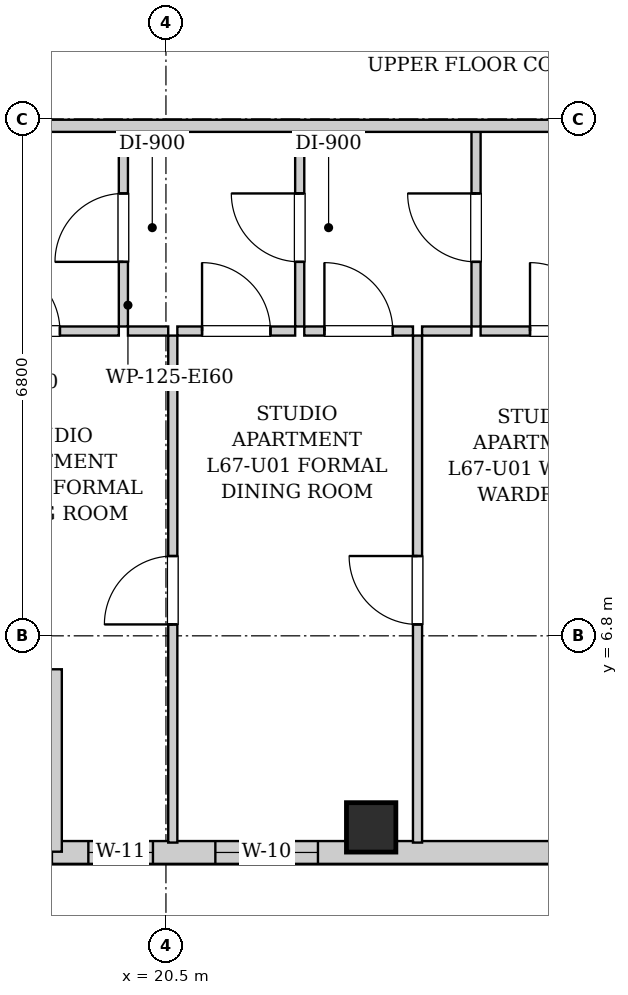
"""IFC4 building model, lengths in metres.
Left out: names, types, materials, properties, quantities, classifications, styles, units other than length and angle.
Written with IfcOpenShell. Run it as: python <this file> out.ifc"""

import sys

from ifc_helpers import new_model, si_unit, direction, frame, frame_2d, origin, origin_2d, place, context, subcontext, project, spatial, rectangle, extrude, element, fill, save


model = new_model("IFC4")
c1 = context("Model", 3, precision=1e-05, world=origin(), true_north=direction((0.0, 1.0)))
c2 = subcontext(c1, "Body", "Model", "MODEL_VIEW")
j1 = project(units=[si_unit("LENGTHUNIT", "METRE"), si_unit("PLANEANGLEUNIT", "RADIAN")], contexts=[c1])
p1 = place(None, origin())
s1 = spatial("IfcSite", under=j1, at=p1, CompositionType="ELEMENT")
p2 = place(p1, origin())
s2 = spatial("IfcBuilding", under=s1, at=p2, CompositionType="ELEMENT")
p3 = place(p2, frame((0.0, 0.0, 230.9)))
s3 = spatial("IfcBuildingStorey", under=s2, at=p3, CompositionType="ELEMENT", Elevation=230.9)
p4 = place(p3, frame((23.2, 4.28, 0.0), z_axis=(0.0, 0.0, 1.0), x_axis=(1.0, 0.0, 0.0)))
e1 = element("IfcColumn", 1, at=p4, inside=s3, PredefinedType="COLUMN", context=c2, shape_type="SweptSolid", body=[
    extrude(rectangle(XDim=0.65, YDim=0.65, at=origin_2d()), origin(), (0.0, 0.0, 1.0), 3.4),
])
p5 = place(p3, frame((31.5, 3.95, 0.0), z_axis=(0.0, 0.0, 1.0), x_axis=(-1.0, 0.0, 0.0)))
e2 = element("IfcWall", 2, at=p5, inside=s3, PredefinedType="SOLIDWALL", context=c2, shape_type="SweptSolid", body=[
    extrude(rectangle(XDim=12.5, YDim=0.3, at=frame_2d((6.25, 0.0))), origin(), (0.0, 0.0, 1.0), 3.14),
])
p6 = place(p5, frame((11.171, 0.0, 0.55)))
e3 = element("IfcOpeningElement", 3, at=p6, cuts=e2, PredefinedType="OPENING", context=c2, shape_type="SweptSolid", body=[
    extrude(rectangle(XDim=0.85, YDim=1.2, at=frame_2d((0.425, 0.6))), frame((0.0, 0.16, 0.0), z_axis=(0.0, -1.0, 0.0), x_axis=(1.0, 0.0, 0.0)), (0.0, 0.0, 1.0), 0.32),
])
p7 = place(p5, frame((9.0, 0.0, 0.55)))
e4 = element("IfcOpeningElement", 4, at=p7, cuts=e2, PredefinedType="OPENING", context=c2, shape_type="SweptSolid", body=[
    extrude(rectangle(XDim=1.35, YDim=1.2, at=frame_2d((0.675, 0.6))), frame((0.0, 0.16, 0.0), z_axis=(0.0, -1.0, 0.0), x_axis=(1.0, 0.0, 0.0)), (0.0, 0.0, 1.0), 0.32),
])
p8 = place(p5, frame((2.186, 0.0, 0.55)))
e5 = element("IfcOpeningElement", 5, at=p8, cuts=e2, PredefinedType="OPENING", context=c2, shape_type="SweptSolid", body=[
    extrude(rectangle(XDim=1.35, YDim=1.2, at=frame_2d((0.675, 0.6))), frame((0.0, 0.16, 0.0), z_axis=(0.0, -1.0, 0.0), x_axis=(1.0, 0.0, 0.0)), (0.0, 0.0, 1.0), 0.32),
])
p9 = place(p5, frame((0.35, 0.0, 0.55)))
e6 = element("IfcOpeningElement", 6, at=p9, cuts=e2, PredefinedType="OPENING", context=c2, shape_type="SweptSolid", body=[
    extrude(rectangle(XDim=0.68, YDim=1.2, at=frame_2d((0.34, 0.6))), frame((0.0, 0.16, 0.0), z_axis=(0.0, -1.0, 0.0), x_axis=(1.0, 0.0, 0.0)), (0.0, 0.0, 1.0), 0.32),
])
p10 = place(p3, frame((19.0, 3.96, 0.0), z_axis=(0.0, 0.0, 1.0), x_axis=(0.0, 1.0, 0.0)))
e7 = element("IfcWall", 7, at=p10, inside=s3, PredefinedType="SOLIDWALL", context=c2, shape_type="SweptSolid", body=[
    extrude(rectangle(XDim=2.4, YDim=0.26, at=frame_2d((1.2, 0.0))), origin(), (0.0, 0.0, 1.0), 3.14),
])
p11 = place(p3, frame((19.94, 10.87, 0.0), z_axis=(0.0, 0.0, 1.0), x_axis=(0.0, 1.0, 0.0)))
e8 = element("IfcWall", 8, at=p11, inside=s3, PredefinedType="PARTITIONING", context=c2, shape_type="SweptSolid", body=[
    extrude(rectangle(XDim=2.6, YDim=0.12, at=frame_2d((1.3, 0.0))), origin(), (0.0, 0.0, 1.0), 3.14),
])
p12 = place(p11, frame((0.85, 0.0, 0.0)))
e9 = element("IfcOpeningElement", 9, at=p12, cuts=e8, PredefinedType="OPENING", context=c2, shape_type="SweptSolid", body=[
    extrude(rectangle(XDim=0.9, YDim=2.05, at=frame_2d((0.45, 1.025))), frame((0.0, 0.07, 0.0), z_axis=(0.0, -1.0, 0.0), x_axis=(1.0, 0.0, 0.0)), (0.0, 0.0, 1.0), 0.14),
])
p13 = place(p3, frame((17.43, 10.81, 0.0), z_axis=(0.0, 0.0, 1.0), x_axis=(1.0, 0.0, 0.0)))
e10 = element("IfcWall", 10, at=p13, inside=s3, PredefinedType="PARTITIONING", context=c2, shape_type="SweptSolid", body=[
    extrude(rectangle(XDim=2.45, YDim=0.12, at=frame_2d((1.225, 0.0))), origin(), (0.0, 0.0, 1.0), 3.14),
])
p14 = place(p13, frame((0.775, 0.0, 0.0)))
e11 = element("IfcOpeningElement", 11, at=p14, cuts=e10, PredefinedType="OPENING", context=c2, shape_type="SweptSolid", body=[
    extrude(rectangle(XDim=0.9, YDim=2.05, at=frame_2d((0.45, 1.025))), frame((0.0, 0.07, 0.0), z_axis=(0.0, -1.0, 0.0), x_axis=(1.0, 0.0, 0.0)), (0.0, 0.0, 1.0), 0.14),
])
p15 = place(p3, frame((22.26, 10.87, 0.0), z_axis=(0.0, 0.0, 1.0), x_axis=(0.0, 1.0, 0.0)))
e12 = element("IfcWall", 12, at=p15, inside=s3, PredefinedType="PARTITIONING", context=c2, shape_type="SweptSolid", body=[
    extrude(rectangle(XDim=2.6, YDim=0.12, at=frame_2d((1.3, 0.0))), origin(), (0.0, 0.0, 1.0), 3.14),
])
p16 = place(p15, frame((0.85, 0.0, 0.0)))
e13 = element("IfcOpeningElement", 13, at=p16, cuts=e12, PredefinedType="OPENING", context=c2, shape_type="SweptSolid", body=[
    extrude(rectangle(XDim=0.9, YDim=2.05, at=frame_2d((0.45, 1.025))), frame((0.0, 0.07, 0.0), z_axis=(0.0, -1.0, 0.0), x_axis=(1.0, 0.0, 0.0)), (0.0, 0.0, 1.0), 0.14),
])
p17 = place(p3, frame((20.0, 10.81, 0.0), z_axis=(0.0, 0.0, 1.0), x_axis=(1.0, 0.0, 0.0)))
e14 = element("IfcWall", 14, at=p17, inside=s3, PredefinedType="PARTITIONING", context=c2, shape_type="SweptSolid", body=[
    extrude(rectangle(XDim=0.53, YDim=0.12, at=frame_2d((0.265, 0.0))), origin(), (0.0, 0.0, 1.0), 3.14),
])
p18 = place(p3, frame((20.65, 10.81, 0.0), z_axis=(0.0, 0.0, 1.0), x_axis=(1.0, 0.0, 0.0)))
e15 = element("IfcWall", 15, at=p18, inside=s3, PredefinedType="PARTITIONING", context=c2, shape_type="SweptSolid", body=[
    extrude(rectangle(XDim=1.55, YDim=0.12, at=frame_2d((0.775, 0.0))), origin(), (0.0, 0.0, 1.0), 3.14),
])
p19 = place(p18, frame((0.325, 0.0, 0.0)))
e16 = element("IfcOpeningElement", 16, at=p19, cuts=e15, PredefinedType="OPENING", context=c2, shape_type="SweptSolid", body=[
    extrude(rectangle(XDim=0.9, YDim=2.05, at=frame_2d((0.45, 1.025))), frame((0.0, 0.07, 0.0), z_axis=(0.0, -1.0, 0.0), x_axis=(1.0, 0.0, 0.0)), (0.0, 0.0, 1.0), 0.14),
])
p20 = place(p3, frame((24.58, 10.87, 0.0), z_axis=(0.0, 0.0, 1.0), x_axis=(0.0, 1.0, 0.0)))
e17 = element("IfcWall", 17, at=p20, inside=s3, PredefinedType="PARTITIONING", context=c2, shape_type="SweptSolid", body=[
    extrude(rectangle(XDim=2.6, YDim=0.12, at=frame_2d((1.3, 0.0))), origin(), (0.0, 0.0, 1.0), 3.14),
])
p21 = place(p20, frame((0.85, 0.0, 0.0)))
e18 = element("IfcOpeningElement", 18, at=p21, cuts=e17, PredefinedType="OPENING", context=c2, shape_type="SweptSolid", body=[
    extrude(rectangle(XDim=0.9, YDim=2.05, at=frame_2d((0.45, 1.025))), frame((0.0, 0.07, 0.0), z_axis=(0.0, -1.0, 0.0), x_axis=(1.0, 0.0, 0.0)), (0.0, 0.0, 1.0), 0.14),
])
p22 = place(p3, frame((22.32, 10.81, 0.0), z_axis=(0.0, 0.0, 1.0), x_axis=(1.0, 0.0, 0.0)))
e19 = element("IfcWall", 19, at=p22, inside=s3, PredefinedType="PARTITIONING", context=c2, shape_type="SweptSolid", body=[
    extrude(rectangle(XDim=1.43, YDim=0.12, at=frame_2d((0.715, 0.0))), origin(), (0.0, 0.0, 1.0), 3.14),
])
p23 = place(p22, frame((0.265, 0.0, 0.0)))
e20 = element("IfcOpeningElement", 20, at=p23, cuts=e19, PredefinedType="OPENING", context=c2, shape_type="SweptSolid", body=[
    extrude(rectangle(XDim=0.9, YDim=2.05, at=frame_2d((0.45, 1.025))), frame((0.0, 0.07, 0.0), z_axis=(0.0, -1.0, 0.0), x_axis=(1.0, 0.0, 0.0)), (0.0, 0.0, 1.0), 0.14),
])
p24 = place(p3, frame((23.87, 10.81, 0.0), z_axis=(0.0, 0.0, 1.0), x_axis=(1.0, 0.0, 0.0)))
e21 = element("IfcWall", 21, at=p24, inside=s3, PredefinedType="PARTITIONING", context=c2, shape_type="SweptSolid", body=[
    extrude(rectangle(XDim=0.65, YDim=0.12, at=frame_2d((0.325, 0.0))), origin(), (0.0, 0.0, 1.0), 3.14),
])
p25 = place(p3, frame((24.64, 10.81, 0.0), z_axis=(0.0, 0.0, 1.0), x_axis=(1.0, 0.0, 0.0)))
e22 = element("IfcWall", 22, at=p25, inside=s3, PredefinedType="PARTITIONING", context=c2, shape_type="SweptSolid", body=[
    extrude(rectangle(XDim=2.2, YDim=0.12, at=frame_2d((1.1, 0.0))), origin(), (0.0, 0.0, 1.0), 3.14),
])
p26 = place(p25, frame((0.65, 0.0, 0.0)))
e23 = element("IfcOpeningElement", 23, at=p26, cuts=e22, PredefinedType="OPENING", context=c2, shape_type="SweptSolid", body=[
    extrude(rectangle(XDim=0.9, YDim=2.05, at=frame_2d((0.45, 1.025))), frame((0.0, 0.07, 0.0), z_axis=(0.0, -1.0, 0.0), x_axis=(1.0, 0.0, 0.0)), (0.0, 0.0, 1.0), 0.14),
])
p27 = place(p3, frame((20.59, 4.08, 0.0), z_axis=(0.0, 0.0, 1.0), x_axis=(0.0, 1.0, 0.0)))
e24 = element("IfcWall", 24, at=p27, inside=s3, PredefinedType="PARTITIONING", context=c2, shape_type="SweptSolid", body=[
    extrude(rectangle(XDim=6.67, YDim=0.12, at=frame_2d((3.335, 0.0))), origin(), (0.0, 0.0, 1.0), 3.14),
])
p28 = place(p27, frame((2.87, 0.0, 0.0)))
e25 = element("IfcOpeningElement", 25, at=p28, cuts=e24, PredefinedType="OPENING", context=c2, shape_type="SweptSolid", body=[
    extrude(rectangle(XDim=0.9, YDim=2.05, at=frame_2d((0.45, 1.025))), frame((0.0, 0.07, 0.0), z_axis=(0.0, -1.0, 0.0), x_axis=(1.0, 0.0, 0.0)), (0.0, 0.0, 1.0), 0.14),
])
p29 = place(p3, frame((23.81, 4.08, 0.0), z_axis=(0.0, 0.0, 1.0), x_axis=(0.0, 1.0, 0.0)))
e26 = element("IfcWall", 26, at=p29, inside=s3, PredefinedType="PARTITIONING", context=c2, shape_type="SweptSolid", body=[
    extrude(rectangle(XDim=6.67, YDim=0.12, at=frame_2d((3.335, 0.0))), origin(), (0.0, 0.0, 1.0), 3.14),
])
p30 = place(p29, frame((2.87, 0.0, 0.0)))
e27 = element("IfcOpeningElement", 27, at=p30, cuts=e26, PredefinedType="OPENING", context=c2, shape_type="SweptSolid", body=[
    extrude(rectangle(XDim=0.9, YDim=2.05, at=frame_2d((0.45, 1.025))), frame((0.0, 0.07, 0.0), z_axis=(0.0, -1.0, 0.0), x_axis=(1.0, 0.0, 0.0)), (0.0, 0.0, 1.0), 0.14),
])
p31 = place(p3, frame((13.15, 13.51, 0.0), z_axis=(0.0, 0.0, 1.0), x_axis=(1.0, 0.0, 0.0)))
e28 = element("IfcWall", 28, at=p31, inside=s3, PredefinedType="PARTITIONING", context=c2, shape_type="SweptSolid", body=[
    extrude(rectangle(XDim=24.6, YDim=0.16, at=frame_2d((12.3, 0.0))), origin(), (0.0, 0.0, 1.0), 3.14),
])
p32 = place(p31, frame((3.165, 0.0, 0.0)))
e29 = element("IfcOpeningElement", 29, at=p32, cuts=e28, PredefinedType="OPENING", context=c2, shape_type="SweptSolid", body=[
    extrude(rectangle(XDim=0.95, YDim=2.1, at=frame_2d((0.475, 1.05))), frame((0.0, 0.09, 0.0), z_axis=(0.0, -1.0, 0.0), x_axis=(1.0, 0.0, 0.0)), (0.0, 0.0, 1.0), 0.18),
])
p33 = place(p12, origin())
e30 = element("IfcDoor", 30, at=p33, inside=s3, OperationType="SINGLE_SWING_LEFT", PredefinedType="DOOR", context=c2, shape_type="SweptSolid", body=[
    extrude(rectangle(XDim=0.9, YDim=2.05, at=frame_2d((0.45, 1.025))), frame((0.0, 0.025, 0.0), z_axis=(0.0, -1.0, 0.0), x_axis=(1.0, 0.0, 0.0)), (0.0, 0.0, 1.0), 0.05),
])
fill(e9, e30)
p34 = place(p14, origin())
e31 = element("IfcDoor", 31, at=p34, inside=s3, OperationType="SINGLE_SWING_LEFT", PredefinedType="DOOR", context=c2, shape_type="SweptSolid", body=[
    extrude(rectangle(XDim=0.9, YDim=2.05, at=frame_2d((0.45, 1.025))), frame((0.0, 0.025, 0.0), z_axis=(0.0, -1.0, 0.0), x_axis=(1.0, 0.0, 0.0)), (0.0, 0.0, 1.0), 0.05),
])
fill(e11, e31)
p35 = place(p16, origin())
e32 = element("IfcDoor", 32, at=p35, inside=s3, OperationType="SINGLE_SWING_RIGHT", PredefinedType="DOOR", context=c2, shape_type="SweptSolid", body=[
    extrude(rectangle(XDim=0.9, YDim=2.05, at=frame_2d((0.45, 1.025))), frame((0.0, 0.025, 0.0), z_axis=(0.0, -1.0, 0.0), x_axis=(1.0, 0.0, 0.0)), (0.0, 0.0, 1.0), 0.05),
])
fill(e13, e32)
p36 = place(p19, origin())
e33 = element("IfcDoor", 33, at=p36, inside=s3, OperationType="SINGLE_SWING_LEFT", PredefinedType="DOOR", context=c2, shape_type="SweptSolid", body=[
    extrude(rectangle(XDim=0.9, YDim=2.05, at=frame_2d((0.45, 1.025))), frame((0.0, 0.025, 0.0), z_axis=(0.0, -1.0, 0.0), x_axis=(1.0, 0.0, 0.0)), (0.0, 0.0, 1.0), 0.05),
])
fill(e16, e33)
p37 = place(p21, origin())
e34 = element("IfcDoor", 34, at=p37, inside=s3, OperationType="SINGLE_SWING_RIGHT", PredefinedType="DOOR", context=c2, shape_type="SweptSolid", body=[
    extrude(rectangle(XDim=0.9, YDim=2.05, at=frame_2d((0.45, 1.025))), frame((0.0, 0.025, 0.0), z_axis=(0.0, -1.0, 0.0), x_axis=(1.0, 0.0, 0.0)), (0.0, 0.0, 1.0), 0.05),
])
fill(e18, e34)
p38 = place(p23, origin())
e35 = element("IfcDoor", 35, at=p38, inside=s3, OperationType="SINGLE_SWING_LEFT", PredefinedType="DOOR", context=c2, shape_type="SweptSolid", body=[
    extrude(rectangle(XDim=0.9, YDim=2.05, at=frame_2d((0.45, 1.025))), frame((0.0, 0.025, 0.0), z_axis=(0.0, -1.0, 0.0), x_axis=(1.0, 0.0, 0.0)), (0.0, 0.0, 1.0), 0.05),
])
fill(e20, e35)
p39 = place(p26, origin())
e36 = element("IfcDoor", 36, at=p39, inside=s3, OperationType="SINGLE_SWING_LEFT", PredefinedType="DOOR", context=c2, shape_type="SweptSolid", body=[
    extrude(rectangle(XDim=0.9, YDim=2.05, at=frame_2d((0.45, 1.025))), frame((0.0, 0.025, 0.0), z_axis=(0.0, -1.0, 0.0), x_axis=(1.0, 0.0, 0.0)), (0.0, 0.0, 1.0), 0.05),
])
fill(e23, e36)
p40 = place(p28, origin())
e37 = element("IfcDoor", 37, at=p40, inside=s3, OperationType="SINGLE_SWING_LEFT", PredefinedType="DOOR", context=c2, shape_type="SweptSolid", body=[
    extrude(rectangle(XDim=0.9, YDim=2.05, at=frame_2d((0.45, 1.025))), frame((0.0, 0.025, 0.0), z_axis=(0.0, -1.0, 0.0), x_axis=(1.0, 0.0, 0.0)), (0.0, 0.0, 1.0), 0.05),
])
fill(e25, e37)
p41 = place(p30, origin())
e38 = element("IfcDoor", 38, at=p41, inside=s3, OperationType="SINGLE_SWING_RIGHT", PredefinedType="DOOR", context=c2, shape_type="SweptSolid", body=[
    extrude(rectangle(XDim=0.9, YDim=2.05, at=frame_2d((0.45, 1.025))), frame((0.0, 0.025, 0.0), z_axis=(0.0, -1.0, 0.0), x_axis=(1.0, 0.0, 0.0)), (0.0, 0.0, 1.0), 0.05),
])
fill(e27, e38)
p42 = place(p6, origin())
e39 = element("IfcWindow", 39, at=p42, inside=s3, PartitioningType="SINGLE_PANEL", PredefinedType="WINDOW", context=c2, shape_type="SweptSolid", body=[
    extrude(rectangle(XDim=0.85, YDim=1.2, at=frame_2d((0.425, 0.6))), frame((0.0, 0.03, 0.0), z_axis=(0.0, -1.0, 0.0), x_axis=(1.0, 0.0, 0.0)), (0.0, 0.0, 1.0), 0.06),
])
fill(e3, e39)
p43 = place(p7, origin())
e40 = element("IfcWindow", 40, at=p43, inside=s3, PartitioningType="SINGLE_PANEL", PredefinedType="WINDOW", context=c2, shape_type="SweptSolid", body=[
    extrude(rectangle(XDim=1.35, YDim=1.2, at=frame_2d((0.675, 0.6))), frame((0.0, 0.03, 0.0), z_axis=(0.0, -1.0, 0.0), x_axis=(1.0, 0.0, 0.0)), (0.0, 0.0, 1.0), 0.06),
])
fill(e4, e40)
save(model, sys.argv[1])
